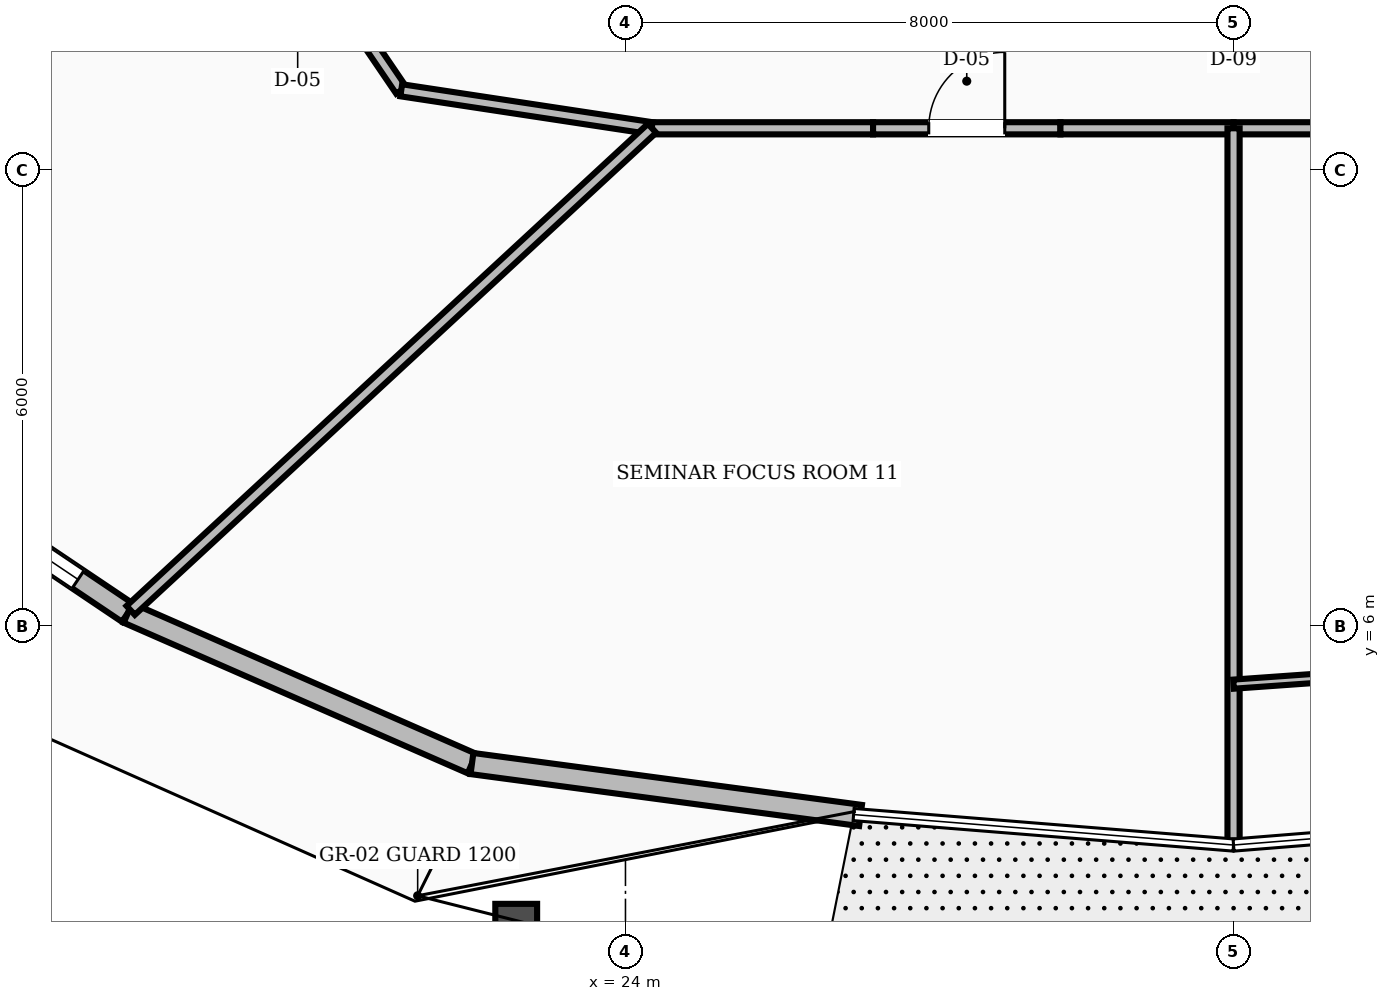
"""IFC4 building model, lengths in metres.
Left out: names, types, materials, properties, quantities, classifications, styles, units other than length and angle.
Written with IfcOpenShell. Run it as: python <this file> out.ifc"""

import sys

from ifc_helpers import new_model, si_unit, direction, frame, frame_2d, origin, place, context, subcontext, project, spatial, rectangle, extrude, element, fill, save


model = new_model("IFC4")
c1 = context("Model", 3, precision=1e-05, world=origin(), true_north=direction((0.0, 1.0)))
c2 = subcontext(c1, "Body", "Model", "MODEL_VIEW")
j1 = project(units=[si_unit("LENGTHUNIT", "METRE"), si_unit("PLANEANGLEUNIT", "RADIAN")], contexts=[c1])
p1 = place(None, origin())
s1 = spatial("IfcSite", under=j1, at=p1, CompositionType="ELEMENT")
p2 = place(p1, origin())
s2 = spatial("IfcBuilding", under=s1, at=p2, CompositionType="ELEMENT")
p3 = place(p2, frame((0.0, 0.0, 164.0)))
s3 = spatial("IfcBuildingStorey", under=s2, at=p3, CompositionType="ELEMENT", Elevation=164.0)
p4 = place(p3, frame((13.486, 8.84, 0.0), z_axis=(0.0, 0.0, 1.0), x_axis=(0.829970169982, -0.55780777777, 0.0)))
e1 = element("IfcWall", 1, at=p4, inside=s3, PredefinedType="STANDARD", context=c2, shape_type="SweptSolid", body=[
    extrude(rectangle(XDim=4.78, YDim=0.28, at=frame_2d((2.39, 0.0))), origin(), (0.0, 0.0, 1.0), 2.82),
])
p5 = place(p4, frame((0.79, 0.0, 0.8)))
e2 = element("IfcOpeningElement", 2, at=p5, cuts=e1, PredefinedType="OPENING", context=c2, shape_type="SweptSolid", body=[
    extrude(rectangle(XDim=3.2, YDim=1.65, at=frame_2d((1.6, 0.825))), frame((0.0, 0.15, 0.0), z_axis=(0.0, -1.0, 0.0), x_axis=(1.0, 0.0, 0.0)), (0.0, 0.0, 1.0), 0.3),
])
p6 = place(p3, frame((17.454, 6.174, 0.0), z_axis=(0.0, 0.0, 1.0), x_axis=(0.916097223494, -0.400956203476, 0.0)))
e3 = element("IfcWall", 3, at=p6, inside=s3, PredefinedType="STANDARD", context=c2, shape_type="SweptSolid", body=[
    extrude(rectangle(XDim=4.941, YDim=0.28, at=frame_2d((2.471, 0.0))), origin(), (0.0, 0.0, 1.0), 2.82),
])
p7 = place(p3, frame((21.98, 4.192, 0.0), z_axis=(0.0, 0.0, 1.0), x_axis=(0.991196038101, -0.132402469964, 0.0)))
e4 = element("IfcWall", 4, at=p7, inside=s3, PredefinedType="STANDARD", context=c2, shape_type="SweptSolid", body=[
    extrude(rectangle(XDim=5.157, YDim=0.28, at=frame_2d((2.579, 0.0))), origin(), (0.0, 0.0, 1.0), 2.82),
])
p8 = place(p3, frame((19.35, 15.548, 0.0), z_axis=(0.0, 0.0, 1.0), x_axis=(0.562674669208, -0.826678423955, 0.0)))
e5 = element("IfcWall", 5, at=p8, inside=s3, PredefinedType="SOLIDWALL", context=c2, shape_type="SweptSolid", body=[
    extrude(rectangle(XDim=3.021, YDim=0.16, at=frame_2d((1.511, 0.0))), origin(), (0.0, 0.0, 1.0), 2.8),
])
p9 = place(p8, frame((1.01, 0.0, 0.0)))
e6 = element("IfcOpeningElement", 6, at=p9, cuts=e5, PredefinedType="OPENING", context=c2, shape_type="SweptSolid", body=[
    extrude(rectangle(XDim=1.0, YDim=2.1, at=frame_2d((0.5, 1.05))), frame((0.0, 0.09, 0.0), z_axis=(0.0, -1.0, 0.0), x_axis=(1.0, 0.0, 0.0)), (0.0, 0.0, 1.0), 0.18),
])
p10 = place(p3, frame((21.05, 13.05, 0.0), z_axis=(0.0, 0.0, 1.0), x_axis=(0.988710906508, -0.149835721217, 0.0)))
e7 = element("IfcWall", 7, at=p10, inside=s3, PredefinedType="SOLIDWALL", context=c2, shape_type="SweptSolid", body=[
    extrude(rectangle(XDim=3.337, YDim=0.16, at=frame_2d((1.668, 0.0))), origin(), (0.0, 0.0, 1.0), 2.8),
])
p11 = place(p3, frame((24.349, 12.55, 0.0), z_axis=(0.0, 0.0, 1.0), x_axis=(1.0, 0.0, 0.0)))
e8 = element("IfcWall", 8, at=p11, inside=s3, PredefinedType="SOLIDWALL", context=c2, shape_type="SweptSolid", body=[
    extrude(rectangle(XDim=2.908, YDim=0.16, at=frame_2d((1.454, 0.0))), origin(), (0.0, 0.0, 1.0), 2.8),
])
p12 = place(p3, frame((27.257, 12.55, 0.0), z_axis=(0.0, 0.0, 1.0), x_axis=(1.0, 0.0, 0.0)))
e9 = element("IfcWall", 9, at=p12, inside=s3, PredefinedType="SOLIDWALL", context=c2, shape_type="SweptSolid", body=[
    extrude(rectangle(XDim=2.465, YDim=0.16, at=frame_2d((1.232, 0.0))), origin(), (0.0, 0.0, 1.0), 2.8),
])
p13 = place(p12, frame((0.733, 0.0, 0.0)))
e10 = element("IfcOpeningElement", 10, at=p13, cuts=e9, PredefinedType="OPENING", context=c2, shape_type="SweptSolid", body=[
    extrude(rectangle(XDim=1.0, YDim=2.1, at=frame_2d((0.5, 1.05))), frame((0.0, 0.09, 0.0), z_axis=(0.0, -1.0, 0.0), x_axis=(1.0, 0.0, 0.0)), (0.0, 0.0, 1.0), 0.18),
])
for number, where, z_axis, x_axis in (
    (11, (29.722, 12.55, 0.0), (0.0, 0.0, 1.0), (1.0, 0.0, 0.0)),
    (12, (32.0, 12.55, 0.0), (0.0, 0.0, 1.0), (1.0, 0.0, 0.0)),
):
    element("IfcWall", number, at=place(p3, frame(where, z_axis=z_axis, x_axis=x_axis)), inside=s3, PredefinedType="SOLIDWALL", context=c2, shape_type="SweptSolid", body=[
        extrude(rectangle(XDim=2.278, YDim=0.16, at=frame_2d((1.139, 0.0))), origin(), (0.0, 0.0, 1.0), 2.8),
    ])
p14 = place(p3, frame((24.349, 12.55, 0.0), z_axis=(0.0, 0.0, 1.0), x_axis=(-0.734202998006, -0.67893000944, 0.0)))
e13 = element("IfcWall", 13, at=p14, inside=s3, PredefinedType="SOLIDWALL", context=c2, shape_type="SweptSolid", body=[
    extrude(rectangle(XDim=9.342, YDim=0.16, at=frame_2d((4.671, 0.0))), origin(), (0.0, 0.0, 1.0), 2.8),
])
p15 = place(p3, frame((32.0, 12.55, 0.0), z_axis=(0.0, 0.0, 1.0), x_axis=(0.0, -1.0, 0.0)))
e14 = element("IfcWall", 14, at=p15, inside=s3, PredefinedType="SOLIDWALL", context=c2, shape_type="SweptSolid", body=[
    extrude(rectangle(XDim=9.38, YDim=0.16, at=frame_2d((4.69, 0.0))), origin(), (0.0, 0.0, 1.0), 2.8),
])
p16 = place(p3, frame((32.0, 5.237, 0.0), z_axis=(0.0, 0.0, 1.0), x_axis=(0.997496872259, 0.070710606235, 0.0)))
e15 = element("IfcWall", 15, at=p16, inside=s3, PredefinedType="PARTITIONING", context=c2, shape_type="SweptSolid", body=[
    extrude(rectangle(XDim=4.399, YDim=0.12, at=frame_2d((2.199, 0.0))), origin(), (0.0, 0.0, 1.0), 2.8),
])
p17 = place(p16, frame((1.724, 0.0, 0.0)))
e16 = element("IfcOpeningElement", 16, at=p17, cuts=e15, PredefinedType="OPENING", context=c2, shape_type="SweptSolid", body=[
    extrude(rectangle(XDim=0.95, YDim=2.1, at=frame_2d((0.475, 1.05))), frame((0.0, 0.07, 0.0), z_axis=(0.0, -1.0, 0.0), x_axis=(1.0, 0.0, 0.0)), (0.0, 0.0, 1.0), 0.14),
])
p18 = place(p5, origin())
e17 = element("IfcWindow", 17, at=p18, inside=s3, PartitioningType="SINGLE_PANEL", PredefinedType="WINDOW", context=c2, shape_type="SweptSolid", body=[
    extrude(rectangle(XDim=3.2, YDim=1.65, at=frame_2d((1.6, 0.825))), frame((0.0, 0.03, 0.0), z_axis=(0.0, -1.0, 0.0), x_axis=(1.0, 0.0, 0.0)), (0.0, 0.0, 1.0), 0.06),
])
fill(e2, e17)
p19 = place(p13, origin())
e18 = element("IfcDoor", 18, at=p19, inside=s3, OperationType="SINGLE_SWING_RIGHT", PredefinedType="DOOR", context=c2, shape_type="SweptSolid", body=[
    extrude(rectangle(XDim=1.0, YDim=2.1, at=frame_2d((0.5, 1.05))), frame((0.0, 0.025, 0.0), z_axis=(0.0, -1.0, 0.0), x_axis=(1.0, 0.0, 0.0)), (0.0, 0.0, 1.0), 0.05),
])
fill(e10, e18)
save(model, sys.argv[1])
